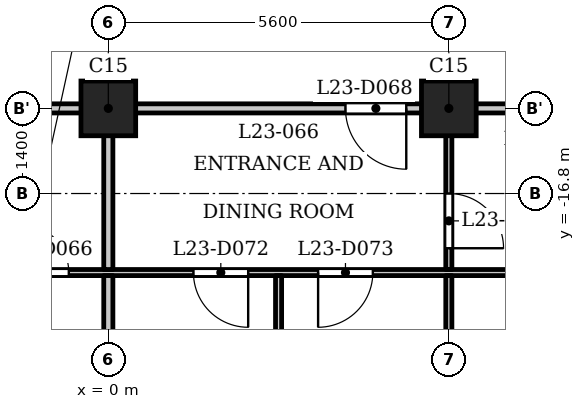
"""IFC4 building model, lengths in metres.
Left out: names, types, materials, properties, quantities, classifications, styles, units other than length and angle.
Written with IfcOpenShell. Run it as: python <this file> out.ifc"""

import sys

from ifc_helpers import new_model, si_unit, direction, frame, frame_2d, origin, origin_2d, place, context, subcontext, project, spatial, rectangle, extrude, element, fill, save


model = new_model("IFC4")
c1 = context("Model", 3, precision=1e-05, world=origin(), true_north=direction((0.0, 1.0)))
c2 = subcontext(c1, "Body", "Model", "MODEL_VIEW")
j1 = project(units=[si_unit("LENGTHUNIT", "METRE"), si_unit("PLANEANGLEUNIT", "RADIAN")], contexts=[c1])
p1 = place(None, origin())
s1 = spatial("IfcSite", under=j1, at=p1, CompositionType="ELEMENT")
p2 = place(p1, origin())
s2 = spatial("IfcBuilding", under=s1, at=p2, CompositionType="ELEMENT")
p3 = place(p2, frame((0.0, 0.0, 93.8)))
s3 = spatial("IfcBuildingStorey", under=s2, at=p3, CompositionType="ELEMENT", Elevation=93.8)
for number, where, z_axis, x_axis in (
    (1, (0.0, -15.4, 0.0), (0.0, 0.0, 1.0), (1.0, 0.0, 0.0)),
    (2, (5.6, -15.4, 0.0), (0.0, 0.0, 1.0), (1.0, 0.0, 0.0)),
):
    element("IfcColumn", number, at=place(p3, frame(where, z_axis=z_axis, x_axis=x_axis)), inside=s3, PredefinedType="COLUMN", context=c2, shape_type="SweptSolid", body=[
        extrude(rectangle(XDim=0.9, YDim=0.9, at=origin_2d()), origin(), (0.0, 0.0, 1.0), 3.5),
    ])
p4 = place(p3, frame((-26.19, -18.1, 0.0), z_axis=(0.0, 0.0, 1.0), x_axis=(1.0, 0.0, 0.0)))
e3 = element("IfcWall", 3, at=p4, inside=s3, PredefinedType="PARTITIONING", context=c2, shape_type="SweptSolid", body=[
    extrude(rectangle(XDim=52.63, YDim=0.1, at=frame_2d((26.315, 0.0))), origin(), (0.0, 0.0, 1.0), 3.2),
])
p5 = place(p4, frame((1.09, 0.0, 0.0)))
e4 = element("IfcOpeningElement", 4, at=p5, cuts=e3, PredefinedType="OPENING", context=c2, shape_type="SweptSolid", body=[
    extrude(rectangle(XDim=0.8, YDim=2.1, at=frame_2d((0.4, 1.05))), frame((0.0, 0.06, 0.0), z_axis=(0.0, -1.0, 0.0), x_axis=(1.0, 0.0, 0.0)), (0.0, 0.0, 1.0), 0.12),
])
p6 = place(p4, frame((4.44, 0.0, 0.0)))
e5 = element("IfcOpeningElement", 5, at=p6, cuts=e3, PredefinedType="OPENING", context=c2, shape_type="SweptSolid", body=[
    extrude(rectangle(XDim=0.9, YDim=2.1, at=frame_2d((0.45, 1.05))), frame((0.0, 0.06, 0.0), z_axis=(0.0, -1.0, 0.0), x_axis=(1.0, 0.0, 0.0)), (0.0, 0.0, 1.0), 0.12),
])
p7 = place(p4, frame((10.04, 0.0, 0.0)))
e6 = element("IfcOpeningElement", 6, at=p7, cuts=e3, PredefinedType="OPENING", context=c2, shape_type="SweptSolid", body=[
    extrude(rectangle(XDim=0.8, YDim=2.1, at=frame_2d((0.4, 1.05))), frame((0.0, 0.06, 0.0), z_axis=(0.0, -1.0, 0.0), x_axis=(1.0, 0.0, 0.0)), (0.0, 0.0, 1.0), 0.12),
])
p8 = place(p4, frame((15.64, 0.0, 0.0)))
e7 = element("IfcOpeningElement", 7, at=p8, cuts=e3, PredefinedType="OPENING", context=c2, shape_type="SweptSolid", body=[
    extrude(rectangle(XDim=0.9, YDim=2.1, at=frame_2d((0.45, 1.05))), frame((0.0, 0.06, 0.0), z_axis=(0.0, -1.0, 0.0), x_axis=(1.0, 0.0, 0.0)), (0.0, 0.0, 1.0), 0.12),
])
p9 = place(p4, frame((24.74, 0.0, 0.0)))
e8 = element("IfcOpeningElement", 8, at=p9, cuts=e3, PredefinedType="OPENING", context=c2, shape_type="SweptSolid", body=[
    extrude(rectangle(XDim=0.8, YDim=2.1, at=frame_2d((0.4, 1.05))), frame((0.0, 0.06, 0.0), z_axis=(0.0, -1.0, 0.0), x_axis=(1.0, 0.0, 0.0)), (0.0, 0.0, 1.0), 0.12),
])
p10 = place(p4, frame((21.24, 0.0, 0.0)))
e9 = element("IfcOpeningElement", 9, at=p10, cuts=e3, PredefinedType="OPENING", context=c2, shape_type="SweptSolid", body=[
    extrude(rectangle(XDim=0.9, YDim=2.1, at=frame_2d((0.45, 1.05))), frame((0.0, 0.06, 0.0), z_axis=(0.0, -1.0, 0.0), x_axis=(1.0, 0.0, 0.0)), (0.0, 0.0, 1.0), 0.12),
])
p11 = place(p4, frame((35.94, 0.0, 0.0)))
e10 = element("IfcOpeningElement", 10, at=p11, cuts=e3, PredefinedType="OPENING", context=c2, shape_type="SweptSolid", body=[
    extrude(rectangle(XDim=0.8, YDim=2.1, at=frame_2d((0.4, 1.05))), frame((0.0, 0.06, 0.0), z_axis=(0.0, -1.0, 0.0), x_axis=(1.0, 0.0, 0.0)), (0.0, 0.0, 1.0), 0.12),
])
p12 = place(p4, frame((33.19, 0.0, 0.0)))
e11 = element("IfcOpeningElement", 11, at=p12, cuts=e3, PredefinedType="OPENING", context=c2, shape_type="SweptSolid", body=[
    extrude(rectangle(XDim=0.9, YDim=2.1, at=frame_2d((0.45, 1.05))), frame((0.0, 0.06, 0.0), z_axis=(0.0, -1.0, 0.0), x_axis=(1.0, 0.0, 0.0)), (0.0, 0.0, 1.0), 0.12),
])
p13 = place(p4, frame((27.59, 0.0, 0.0)))
e12 = element("IfcOpeningElement", 12, at=p13, cuts=e3, PredefinedType="OPENING", context=c2, shape_type="SweptSolid", body=[
    extrude(rectangle(XDim=0.9, YDim=2.1, at=frame_2d((0.45, 1.05))), frame((0.0, 0.06, 0.0), z_axis=(0.0, -1.0, 0.0), x_axis=(1.0, 0.0, 0.0)), (0.0, 0.0, 1.0), 0.12),
])
p14 = place(p4, frame((29.64, 0.0, 0.0)))
e13 = element("IfcOpeningElement", 13, at=p14, cuts=e3, PredefinedType="OPENING", context=c2, shape_type="SweptSolid", body=[
    extrude(rectangle(XDim=0.9, YDim=2.1, at=frame_2d((0.45, 1.05))), frame((0.0, 0.06, 0.0), z_axis=(0.0, -1.0, 0.0), x_axis=(1.0, 0.0, 0.0)), (0.0, 0.0, 1.0), 0.12),
])
p15 = place(p4, frame((41.54, 0.0, 0.0)))
e14 = element("IfcOpeningElement", 14, at=p15, cuts=e3, PredefinedType="OPENING", context=c2, shape_type="SweptSolid", body=[
    extrude(rectangle(XDim=0.8, YDim=2.1, at=frame_2d((0.4, 1.05))), frame((0.0, 0.06, 0.0), z_axis=(0.0, -1.0, 0.0), x_axis=(1.0, 0.0, 0.0)), (0.0, 0.0, 1.0), 0.12),
])
p16 = place(p4, frame((38.54, 0.0, 0.0)))
e15 = element("IfcOpeningElement", 15, at=p16, cuts=e3, PredefinedType="OPENING", context=c2, shape_type="SweptSolid", body=[
    extrude(rectangle(XDim=0.9, YDim=2.1, at=frame_2d((0.45, 1.05))), frame((0.0, 0.06, 0.0), z_axis=(0.0, -1.0, 0.0), x_axis=(1.0, 0.0, 0.0)), (0.0, 0.0, 1.0), 0.12),
])
p17 = place(p4, frame((49.204, 0.0, 0.0)))
e16 = element("IfcOpeningElement", 16, at=p17, cuts=e3, PredefinedType="OPENING", context=c2, shape_type="SweptSolid", body=[
    extrude(rectangle(XDim=0.8, YDim=2.1, at=frame_2d((0.4, 1.05))), frame((0.0, 0.06, 0.0), z_axis=(0.0, -1.0, 0.0), x_axis=(1.0, 0.0, 0.0)), (0.0, 0.0, 1.0), 0.12),
])
p18 = place(p4, frame((43.64, 0.0, 0.0)))
e17 = element("IfcOpeningElement", 17, at=p18, cuts=e3, PredefinedType="OPENING", context=c2, shape_type="SweptSolid", body=[
    extrude(rectangle(XDim=0.9, YDim=2.1, at=frame_2d((0.45, 1.05))), frame((0.0, 0.06, 0.0), z_axis=(0.0, -1.0, 0.0), x_axis=(1.0, 0.0, 0.0)), (0.0, 0.0, 1.0), 0.12),
])
p19 = place(p3, frame((-27.484, -15.4, 0.0), z_axis=(0.0, 0.0, 1.0), x_axis=(1.0, 0.0, 0.0)))
e18 = element("IfcWall", 18, at=p19, inside=s3, PredefinedType="PARTITIONING", context=c2, shape_type="SweptSolid", body=[
    extrude(rectangle(XDim=54.968, YDim=0.15, at=frame_2d((27.484, 0.0))), origin(), (0.0, 0.0, 1.0), 3.2),
])
p20 = place(p19, frame((5.734, 0.0, 0.0)))
e19 = element("IfcOpeningElement", 19, at=p20, cuts=e18, PredefinedType="OPENING", context=c2, shape_type="SweptSolid", body=[
    extrude(rectangle(XDim=1.0, YDim=2.1, at=frame_2d((0.5, 1.05))), frame((0.0, 0.085, 0.0), z_axis=(0.0, -1.0, 0.0), x_axis=(1.0, 0.0, 0.0)), (0.0, 0.0, 1.0), 0.17),
])
p21 = place(p19, frame((16.934, 0.0, 0.0)))
e20 = element("IfcOpeningElement", 20, at=p21, cuts=e18, PredefinedType="OPENING", context=c2, shape_type="SweptSolid", body=[
    extrude(rectangle(XDim=1.0, YDim=2.1, at=frame_2d((0.5, 1.05))), frame((0.0, 0.085, 0.0), z_axis=(0.0, -1.0, 0.0), x_axis=(1.0, 0.0, 0.0)), (0.0, 0.0, 1.0), 0.17),
])
p22 = place(p19, frame((22.534, 0.0, 0.0)))
e21 = element("IfcOpeningElement", 21, at=p22, cuts=e18, PredefinedType="OPENING", context=c2, shape_type="SweptSolid", body=[
    extrude(rectangle(XDim=1.0, YDim=2.1, at=frame_2d((0.5, 1.05))), frame((0.0, 0.085, 0.0), z_axis=(0.0, -1.0, 0.0), x_axis=(1.0, 0.0, 0.0)), (0.0, 0.0, 1.0), 0.17),
])
p23 = place(p19, frame((31.384, 0.0, 0.0)))
e22 = element("IfcOpeningElement", 22, at=p23, cuts=e18, PredefinedType="OPENING", context=c2, shape_type="SweptSolid", body=[
    extrude(rectangle(XDim=1.0, YDim=2.1, at=frame_2d((0.5, 1.05))), frame((0.0, 0.085, 0.0), z_axis=(0.0, -1.0, 0.0), x_axis=(1.0, 0.0, 0.0)), (0.0, 0.0, 1.0), 0.17),
])
p24 = place(p19, frame((39.584, 0.0, 0.0)))
e23 = element("IfcOpeningElement", 23, at=p24, cuts=e18, PredefinedType="OPENING", context=c2, shape_type="SweptSolid", body=[
    extrude(rectangle(XDim=1.0, YDim=2.1, at=frame_2d((0.5, 1.05))), frame((0.0, 0.085, 0.0), z_axis=(0.0, -1.0, 0.0), x_axis=(1.0, 0.0, 0.0)), (0.0, 0.0, 1.0), 0.17),
])
p25 = place(p19, frame((44.934, 0.0, 0.0)))
e24 = element("IfcOpeningElement", 24, at=p25, cuts=e18, PredefinedType="OPENING", context=c2, shape_type="SweptSolid", body=[
    extrude(rectangle(XDim=1.0, YDim=2.1, at=frame_2d((0.5, 1.05))), frame((0.0, 0.085, 0.0), z_axis=(0.0, -1.0, 0.0), x_axis=(1.0, 0.0, 0.0)), (0.0, 0.0, 1.0), 0.17),
])
p26 = place(p3, frame((0.0, -23.03, 0.0), z_axis=(0.0, 0.0, 1.0), x_axis=(0.0, 1.0, 0.0)))
e25 = element("IfcWall", 25, at=p26, inside=s3, PredefinedType="PARTITIONING", context=c2, shape_type="SweptSolid", body=[
    extrude(rectangle(XDim=4.88, YDim=0.15, at=frame_2d((2.44, 0.0))), origin(), (0.0, 0.0, 1.0), 3.2),
])
p27 = place(p3, frame((0.0, -18.05, 0.0), z_axis=(0.0, 0.0, 1.0), x_axis=(0.0, 1.0, 0.0)))
e26 = element("IfcWall", 26, at=p27, inside=s3, PredefinedType="PARTITIONING", context=c2, shape_type="SweptSolid", body=[
    extrude(rectangle(XDim=2.575, YDim=0.15, at=frame_2d((1.288, 0.0))), origin(), (0.0, 0.0, 1.0), 3.2),
])
p28 = place(p3, frame((2.8, -22.08, 0.0), z_axis=(0.0, 0.0, 1.0), x_axis=(0.0, 1.0, 0.0)))
e27 = element("IfcWall", 27, at=p28, inside=s3, PredefinedType="PARTITIONING", context=c2, shape_type="SweptSolid", body=[
    extrude(rectangle(XDim=3.93, YDim=0.1, at=frame_2d((1.965, 0.0))), origin(), (0.0, 0.0, 1.0), 3.2),
])
p29 = place(p3, frame((5.6, -23.03, 0.0), z_axis=(0.0, 0.0, 1.0), x_axis=(0.0, 1.0, 0.0)))
e28 = element("IfcWall", 28, at=p29, inside=s3, PredefinedType="PARTITIONING", context=c2, shape_type="SweptSolid", body=[
    extrude(rectangle(XDim=4.88, YDim=0.1, at=frame_2d((2.44, 0.0))), origin(), (0.0, 0.0, 1.0), 3.2),
])
p30 = place(p3, frame((5.6, -18.05, 0.0), z_axis=(0.0, 0.0, 1.0), x_axis=(0.0, 1.0, 0.0)))
e29 = element("IfcWall", 29, at=p30, inside=s3, PredefinedType="PARTITIONING", context=c2, shape_type="SweptSolid", body=[
    extrude(rectangle(XDim=2.575, YDim=0.1, at=frame_2d((1.288, 0.0))), origin(), (0.0, 0.0, 1.0), 3.2),
])
p31 = place(p30, frame((0.35, 0.0, 0.0)))
e30 = element("IfcOpeningElement", 30, at=p31, cuts=e29, PredefinedType="OPENING", context=c2, shape_type="SweptSolid", body=[
    extrude(rectangle(XDim=0.9, YDim=2.1, at=frame_2d((0.45, 1.05))), frame((0.0, 0.06, 0.0), z_axis=(0.0, -1.0, 0.0), x_axis=(1.0, 0.0, 0.0)), (0.0, 0.0, 1.0), 0.12),
])
p32 = place(p9, origin())
e31 = element("IfcDoor", 31, at=p32, inside=s3, OperationType="SINGLE_SWING_RIGHT", PredefinedType="DOOR", context=c2, shape_type="SweptSolid", body=[
    extrude(rectangle(XDim=0.8, YDim=2.1, at=frame_2d((0.4, 1.05))), frame((0.0, 0.025, 0.0), z_axis=(0.0, -1.0, 0.0), x_axis=(1.0, 0.0, 0.0)), (0.0, 0.0, 1.0), 0.05),
])
fill(e8, e31)
p33 = place(p23, origin())
e32 = element("IfcDoor", 32, at=p33, inside=s3, OperationType="SINGLE_SWING_RIGHT", PredefinedType="DOOR", context=c2, shape_type="SweptSolid", body=[
    extrude(rectangle(XDim=1.0, YDim=2.1, at=frame_2d((0.5, 1.05))), frame((0.0, 0.025, 0.0), z_axis=(0.0, -1.0, 0.0), x_axis=(1.0, 0.0, 0.0)), (0.0, 0.0, 1.0), 0.05),
])
fill(e22, e32)
p34 = place(p31, origin())
e33 = element("IfcDoor", 33, at=p34, inside=s3, OperationType="SINGLE_SWING_LEFT", PredefinedType="DOOR", context=c2, shape_type="SweptSolid", body=[
    extrude(rectangle(XDim=0.9, YDim=2.1, at=frame_2d((0.45, 1.05))), frame((0.0, 0.025, 0.0), z_axis=(0.0, -1.0, 0.0), x_axis=(1.0, 0.0, 0.0)), (0.0, 0.0, 1.0), 0.05),
])
fill(e30, e33)
p35 = place(p13, origin())
e34 = element("IfcDoor", 34, at=p35, inside=s3, OperationType="SINGLE_SWING_RIGHT", PredefinedType="DOOR", context=c2, shape_type="SweptSolid", body=[
    extrude(rectangle(XDim=0.9, YDim=2.1, at=frame_2d((0.45, 1.05))), frame((0.0, 0.025, 0.0), z_axis=(0.0, -1.0, 0.0), x_axis=(1.0, 0.0, 0.0)), (0.0, 0.0, 1.0), 0.05),
])
fill(e12, e34)
p36 = place(p14, origin())
e35 = element("IfcDoor", 35, at=p36, inside=s3, OperationType="SINGLE_SWING_LEFT", PredefinedType="DOOR", context=c2, shape_type="SweptSolid", body=[
    extrude(rectangle(XDim=0.9, YDim=2.1, at=frame_2d((0.45, 1.05))), frame((0.0, 0.025, 0.0), z_axis=(0.0, -1.0, 0.0), x_axis=(1.0, 0.0, 0.0)), (0.0, 0.0, 1.0), 0.05),
])
fill(e13, e35)
save(model, sys.argv[1])
